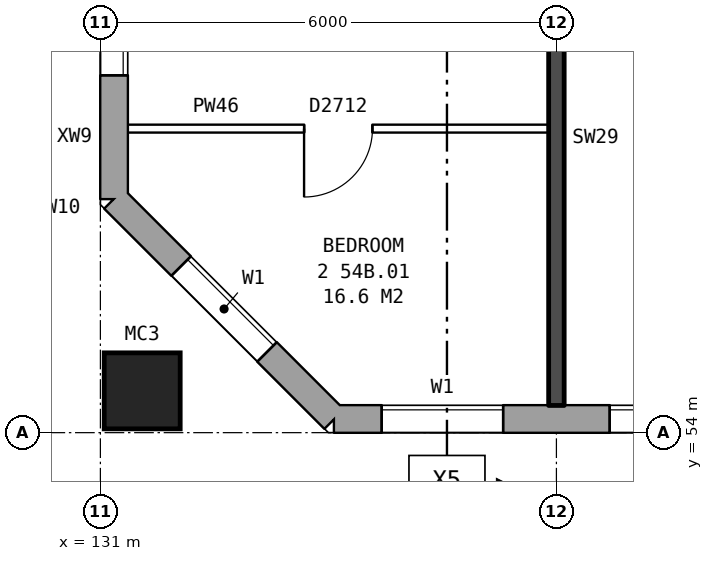
"""IFC4 building model, lengths in metres.
Left out: names, types, materials, properties, quantities, classifications, styles, units other than length and angle.
Written with IfcOpenShell. Run it as: python <this file> out.ifc"""

import sys

from ifc_helpers import new_model, si_unit, direction, frame, frame_2d, origin, origin_2d, place, context, subcontext, project, spatial, rectangle, hollow_rectangle, extrude, element, fill, save


model = new_model("IFC4")
c1 = context("Model", 3, precision=1e-05, world=origin(), true_north=direction((0.0, 1.0)))
c2 = subcontext(c1, "Body", "Model", "MODEL_VIEW")
j1 = project(units=[si_unit("LENGTHUNIT", "METRE"), si_unit("PLANEANGLEUNIT", "RADIAN")], contexts=[c1])
p1 = place(None, origin())
s1 = spatial("IfcSite", under=j1, at=p1, CompositionType="ELEMENT")
p2 = place(p1, origin())
s2 = spatial("IfcBuilding", under=s1, at=p2, CompositionType="ELEMENT")
p3 = place(p2, frame((0.0, 0.0, 191.3)))
s3 = spatial("IfcBuildingStorey", under=s2, at=p3, CompositionType="ELEMENT", Elevation=191.3)
p4 = place(p3, frame((131.55, 54.55, 0.0), z_axis=(0.0, 0.0, 1.0), x_axis=(1.0, 0.0, 0.0)))
e1 = element("IfcColumn", 1, at=p4, inside=s3, PredefinedType="COLUMN", context=c2, shape_type="SweptSolid", body=[
    extrude(hollow_rectangle(XDim=1.0, YDim=1.0, WallThickness=0.055, at=origin_2d()), origin(), (0.0, 0.0, 1.0), 3.1),
])
p5 = place(p3, frame((131.18, 57.075, 0.0), z_axis=(0.0, 0.0, 1.0), x_axis=(0.707106781187, -0.707106781187, 0.0)))
e2 = element("IfcWall", 2, at=p5, inside=s3, PredefinedType="STANDARD", context=c2, shape_type="SweptSolid", body=[
    extrude(rectangle(XDim=4.094, YDim=0.36, at=frame_2d((2.047, 0.0))), origin(), (0.0, 0.0, 1.0), 2.85),
])
p6 = place(p5, frame((1.247, 0.0, 0.8)))
e3 = element("IfcOpeningElement", 3, at=p6, cuts=e2, PredefinedType="OPENING", context=c2, shape_type="SweptSolid", body=[
    extrude(rectangle(XDim=1.6, YDim=1.8, at=frame_2d((0.8, 0.9))), frame((0.0, 0.19, 0.0), z_axis=(0.0, -1.0, 0.0), x_axis=(1.0, 0.0, 0.0)), (0.0, 0.0, 1.0), 0.38),
])
p7 = place(p3, frame((134.075, 54.18, 0.0), z_axis=(0.0, 0.0, 1.0), x_axis=(1.0, 0.0, 0.0)))
e4 = element("IfcWall", 4, at=p7, inside=s3, PredefinedType="STANDARD", context=c2, shape_type="SweptSolid", body=[
    extrude(rectangle(XDim=33.101, YDim=0.36, at=frame_2d((16.55, 0.0))), origin(), (0.0, 0.0, 1.0), 2.85),
])
p8 = place(p7, frame((0.625, 0.0, 0.8)))
e5 = element("IfcOpeningElement", 5, at=p8, cuts=e4, PredefinedType="OPENING", context=c2, shape_type="SweptSolid", body=[
    extrude(rectangle(XDim=1.6, YDim=1.8, at=frame_2d((0.8, 0.9))), frame((0.0, 0.19, 0.0), z_axis=(0.0, -1.0, 0.0), x_axis=(1.0, 0.0, 0.0)), (0.0, 0.0, 1.0), 0.38),
])
p9 = place(p7, frame((3.625, 0.0, 0.8)))
e6 = element("IfcOpeningElement", 6, at=p9, cuts=e4, PredefinedType="OPENING", context=c2, shape_type="SweptSolid", body=[
    extrude(rectangle(XDim=1.6, YDim=1.8, at=frame_2d((0.8, 0.9))), frame((0.0, 0.19, 0.0), z_axis=(0.0, -1.0, 0.0), x_axis=(1.0, 0.0, 0.0)), (0.0, 0.0, 1.0), 0.38),
])
p10 = place(p7, frame((6.625, 0.0, 0.8)))
e7 = element("IfcOpeningElement", 7, at=p10, cuts=e4, PredefinedType="OPENING", context=c2, shape_type="SweptSolid", body=[
    extrude(rectangle(XDim=1.6, YDim=1.8, at=frame_2d((0.8, 0.9))), frame((0.0, 0.19, 0.0), z_axis=(0.0, -1.0, 0.0), x_axis=(1.0, 0.0, 0.0)), (0.0, 0.0, 1.0), 0.38),
])
p11 = place(p7, frame((9.625, 0.0, 0.8)))
e8 = element("IfcOpeningElement", 8, at=p11, cuts=e4, PredefinedType="OPENING", context=c2, shape_type="SweptSolid", body=[
    extrude(rectangle(XDim=1.6, YDim=1.8, at=frame_2d((0.8, 0.9))), frame((0.0, 0.19, 0.0), z_axis=(0.0, -1.0, 0.0), x_axis=(1.0, 0.0, 0.0)), (0.0, 0.0, 1.0), 0.38),
])
p12 = place(p7, frame((12.625, 0.0, 0.8)))
e9 = element("IfcOpeningElement", 9, at=p12, cuts=e4, PredefinedType="OPENING", context=c2, shape_type="SweptSolid", body=[
    extrude(rectangle(XDim=1.6, YDim=1.8, at=frame_2d((0.8, 0.9))), frame((0.0, 0.19, 0.0), z_axis=(0.0, -1.0, 0.0), x_axis=(1.0, 0.0, 0.0)), (0.0, 0.0, 1.0), 0.38),
])
p13 = place(p7, frame((15.925, 0.0, 0.15)))
e10 = element("IfcOpeningElement", 10, at=p13, cuts=e4, PredefinedType="OPENING", context=c2, shape_type="SweptSolid", body=[
    extrude(rectangle(XDim=1.2, YDim=1.2, at=frame_2d((0.6, 0.6))), frame((0.0, 0.19, 0.0), z_axis=(0.0, -1.0, 0.0), x_axis=(1.0, 0.0, 0.0)), (0.0, 0.0, 1.0), 0.38),
])
p14 = place(p7, frame((18.625, 0.0, 0.8)))
e11 = element("IfcOpeningElement", 11, at=p14, cuts=e4, PredefinedType="OPENING", context=c2, shape_type="SweptSolid", body=[
    extrude(rectangle(XDim=1.6, YDim=1.8, at=frame_2d((0.8, 0.9))), frame((0.0, 0.19, 0.0), z_axis=(0.0, -1.0, 0.0), x_axis=(1.0, 0.0, 0.0)), (0.0, 0.0, 1.0), 0.38),
])
p15 = place(p7, frame((21.625, 0.0, 0.8)))
e12 = element("IfcOpeningElement", 12, at=p15, cuts=e4, PredefinedType="OPENING", context=c2, shape_type="SweptSolid", body=[
    extrude(rectangle(XDim=1.6, YDim=1.8, at=frame_2d((0.8, 0.9))), frame((0.0, 0.19, 0.0), z_axis=(0.0, -1.0, 0.0), x_axis=(1.0, 0.0, 0.0)), (0.0, 0.0, 1.0), 0.38),
])
p16 = place(p7, frame((24.625, 0.0, 0.8)))
e13 = element("IfcOpeningElement", 13, at=p16, cuts=e4, PredefinedType="OPENING", context=c2, shape_type="SweptSolid", body=[
    extrude(rectangle(XDim=1.6, YDim=1.8, at=frame_2d((0.8, 0.9))), frame((0.0, 0.19, 0.0), z_axis=(0.0, -1.0, 0.0), x_axis=(1.0, 0.0, 0.0)), (0.0, 0.0, 1.0), 0.38),
])
p17 = place(p7, frame((27.625, 0.0, 0.8)))
e14 = element("IfcOpeningElement", 14, at=p17, cuts=e4, PredefinedType="OPENING", context=c2, shape_type="SweptSolid", body=[
    extrude(rectangle(XDim=1.6, YDim=1.8, at=frame_2d((0.8, 0.9))), frame((0.0, 0.19, 0.0), z_axis=(0.0, -1.0, 0.0), x_axis=(1.0, 0.0, 0.0)), (0.0, 0.0, 1.0), 0.38),
])
p18 = place(p7, frame((30.625, 0.0, 0.8)))
e15 = element("IfcOpeningElement", 15, at=p18, cuts=e4, PredefinedType="OPENING", context=c2, shape_type="SweptSolid", body=[
    extrude(rectangle(XDim=1.6, YDim=1.8, at=frame_2d((0.8, 0.9))), frame((0.0, 0.19, 0.0), z_axis=(0.0, -1.0, 0.0), x_axis=(1.0, 0.0, 0.0)), (0.0, 0.0, 1.0), 0.38),
])
p19 = place(p3, frame((131.18, 63.597, 0.0), z_axis=(0.0, 0.0, 1.0), x_axis=(0.0, -1.0, 0.0)))
e16 = element("IfcWall", 16, at=p19, inside=s3, PredefinedType="STANDARD", context=c2, shape_type="SweptSolid", body=[
    extrude(rectangle(XDim=6.522, YDim=0.36, at=frame_2d((3.261, 0.0))), origin(), (0.0, 0.0, 1.0), 2.85),
])
p20 = place(p19, frame((0.297, 0.0, 0.8)))
e17 = element("IfcOpeningElement", 17, at=p20, cuts=e16, PredefinedType="OPENING", context=c2, shape_type="SweptSolid", body=[
    extrude(rectangle(XDim=1.6, YDim=1.8, at=frame_2d((0.8, 0.9))), frame((0.0, 0.19, 0.0), z_axis=(0.0, -1.0, 0.0), x_axis=(1.0, 0.0, 0.0)), (0.0, 0.0, 1.0), 0.38),
])
p21 = place(p19, frame((3.297, 0.0, 0.8)))
e18 = element("IfcOpeningElement", 18, at=p21, cuts=e16, PredefinedType="OPENING", context=c2, shape_type="SweptSolid", body=[
    extrude(rectangle(XDim=1.6, YDim=1.8, at=frame_2d((0.8, 0.9))), frame((0.0, 0.19, 0.0), z_axis=(0.0, -1.0, 0.0), x_axis=(1.0, 0.0, 0.0)), (0.0, 0.0, 1.0), 0.38),
])
p22 = place(p3, frame((131.36, 58.0, 0.0), z_axis=(0.0, 0.0, 1.0), x_axis=(1.0, 0.0, 0.0)))
e19 = element("IfcWall", 19, at=p22, inside=s3, PredefinedType="PARTITIONING", context=c2, shape_type="SweptSolid", body=[
    extrude(rectangle(XDim=5.54, YDim=0.1, at=frame_2d((2.77, 0.0))), origin(), (0.0, 0.0, 1.0), 2.85),
])
p23 = place(p22, frame((2.32, 0.0, 0.0)))
e20 = element("IfcOpeningElement", 20, at=p23, cuts=e19, PredefinedType="OPENING", context=c2, shape_type="SweptSolid", body=[
    extrude(rectangle(XDim=0.9, YDim=2.1, at=frame_2d((0.45, 1.05))), frame((0.0, 0.06, 0.0), z_axis=(0.0, -1.0, 0.0), x_axis=(1.0, 0.0, 0.0)), (0.0, 0.0, 1.0), 0.12),
])
p24 = place(p3, frame((137.0, 54.36, 0.0), z_axis=(0.0, 0.0, 1.0), x_axis=(0.0, 1.0, 0.0)))
e21 = element("IfcWall", 21, at=p24, inside=s3, PredefinedType="SOLIDWALL", context=c2, shape_type="SweptSolid", body=[
    extrude(rectangle(XDim=9.44, YDim=0.2, at=frame_2d((4.72, 0.0))), origin(), (0.0, 0.0, 1.0), 2.85),
])
p25 = place(p24, frame((7.04, 0.0, 0.0)))
e22 = element("IfcOpeningElement", 22, at=p25, cuts=e21, PredefinedType="OPENING", context=c2, shape_type="SweptSolid", body=[
    extrude(rectangle(XDim=0.9, YDim=2.1, at=frame_2d((0.45, 1.05))), frame((0.0, 0.11, 0.0), z_axis=(0.0, -1.0, 0.0), x_axis=(1.0, 0.0, 0.0)), (0.0, 0.0, 1.0), 0.22),
])
p26 = place(p6, origin())
e23 = element("IfcWindow", 23, at=p26, inside=s3, PartitioningType="SINGLE_PANEL", PredefinedType="WINDOW", context=c2, shape_type="SweptSolid", body=[
    extrude(rectangle(XDim=1.6, YDim=1.8, at=frame_2d((0.8, 0.9))), frame((0.0, 0.15, 0.0), z_axis=(0.0, -1.0, 0.0), x_axis=(1.0, 0.0, 0.0)), (0.0, 0.0, 1.0), 0.06),
])
fill(e3, e23)
p27 = place(p8, origin())
e24 = element("IfcWindow", 24, at=p27, inside=s3, PartitioningType="SINGLE_PANEL", PredefinedType="WINDOW", context=c2, shape_type="SweptSolid", body=[
    extrude(rectangle(XDim=1.6, YDim=1.8, at=frame_2d((0.8, 0.9))), frame((0.0, 0.15, 0.0), z_axis=(0.0, -1.0, 0.0), x_axis=(1.0, 0.0, 0.0)), (0.0, 0.0, 1.0), 0.06),
])
fill(e5, e24)
p28 = place(p9, origin())
e25 = element("IfcWindow", 25, at=p28, inside=s3, PartitioningType="SINGLE_PANEL", PredefinedType="WINDOW", context=c2, shape_type="SweptSolid", body=[
    extrude(rectangle(XDim=1.6, YDim=1.8, at=frame_2d((0.8, 0.9))), frame((0.0, 0.15, 0.0), z_axis=(0.0, -1.0, 0.0), x_axis=(1.0, 0.0, 0.0)), (0.0, 0.0, 1.0), 0.06),
])
fill(e6, e25)
p29 = place(p21, origin())
e26 = element("IfcWindow", 26, at=p29, inside=s3, PartitioningType="SINGLE_PANEL", PredefinedType="WINDOW", context=c2, shape_type="SweptSolid", body=[
    extrude(rectangle(XDim=1.6, YDim=1.8, at=frame_2d((0.8, 0.9))), frame((0.0, 0.15, 0.0), z_axis=(0.0, -1.0, 0.0), x_axis=(1.0, 0.0, 0.0)), (0.0, 0.0, 1.0), 0.06),
])
fill(e18, e26)
p30 = place(p23, frame((0.9, 0.0, 0.0), z_axis=(0.0, 0.0, 1.0), x_axis=(-1.0, 0.0, 0.0)))
e27 = element("IfcDoor", 27, at=p30, inside=s3, OperationType="SINGLE_SWING_RIGHT", PredefinedType="DOOR", context=c2, shape_type="SweptSolid", body=[
    extrude(rectangle(XDim=0.9, YDim=2.1, at=frame_2d((0.45, 1.05))), frame((0.0, 0.025, 0.0), z_axis=(0.0, -1.0, 0.0), x_axis=(1.0, 0.0, 0.0)), (0.0, 0.0, 1.0), 0.05),
])
fill(e20, e27)
save(model, sys.argv[1])
